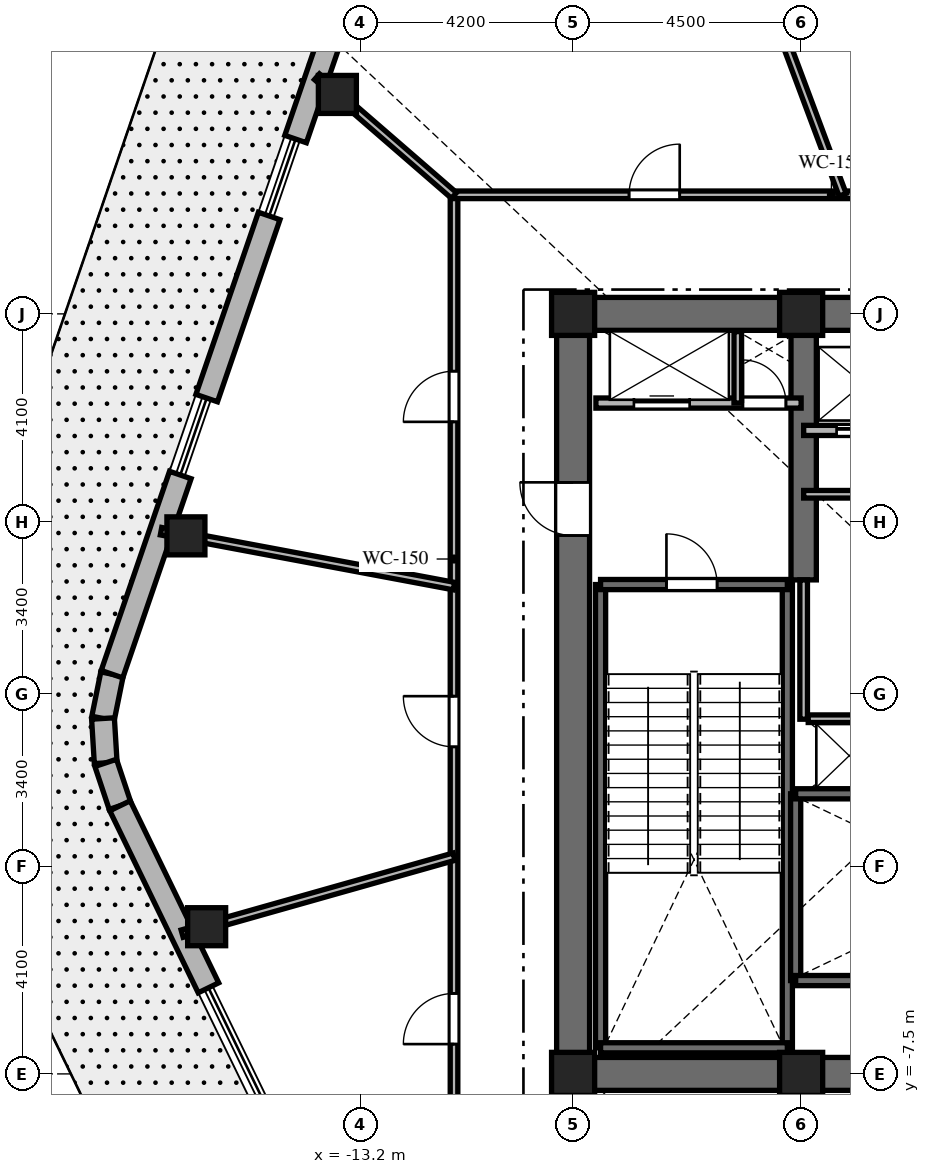
"""IFC4 building model, lengths in metres.
Left out: names, types, materials, properties, quantities, classifications, styles, units other than length and angle.
Written with IfcOpenShell. Run it as: python <this file> out.ifc"""

import sys

from ifc_helpers import new_model, si_unit, direction, frame, frame_2d, origin, origin_2d, place, context, subcontext, project, spatial, rectangle, extrude, element, fill, save


model = new_model("IFC4")
c1 = context("Model", 3, precision=1e-05, world=origin(), true_north=direction((0.0, 1.0)))
c2 = subcontext(c1, "Body", "Model", "MODEL_VIEW")
j1 = project(units=[si_unit("LENGTHUNIT", "METRE"), si_unit("PLANEANGLEUNIT", "RADIAN")], contexts=[c1])
p1 = place(None, origin())
s1 = spatial("IfcSite", under=j1, at=p1, CompositionType="ELEMENT")
p2 = place(p1, origin())
s2 = spatial("IfcBuilding", under=s1, at=p2, CompositionType="ELEMENT")
p3 = place(p2, frame((0.0, 0.0, 305.4)))
s3 = spatial("IfcBuildingStorey", under=s2, at=p3, CompositionType="ELEMENT", Elevation=305.4)
p4 = place(p3, frame((-9.325, -7.5, 0.0), z_axis=(0.0, 0.0, 1.0), x_axis=(1.0, 0.0, 0.0)))
e1 = element("IfcWall", 1, at=p4, inside=s3, PredefinedType="SHEAR", context=c2, shape_type="SweptSolid", body=[
    extrude(rectangle(XDim=18.65, YDim=0.65, at=frame_2d((9.325, 0.0))), origin(), (0.0, 0.0, 1.0), 5.0),
])
p5 = place(p4, frame((9.375, 0.0, 0.0)))
e2 = element("IfcOpeningElement", 2, at=p5, cuts=e1, PredefinedType="OPENING", context=c2, shape_type="SweptSolid", body=[
    extrude(rectangle(XDim=1.0, YDim=2.15, at=frame_2d((0.5, 1.075))), frame((0.0, 0.335, 0.0), z_axis=(0.0, -1.0, 0.0), x_axis=(1.0, 0.0, 0.0)), (0.0, 0.0, 1.0), 0.67),
])
p6 = place(p3, frame((-9.325, 7.5, 0.0), z_axis=(0.0, 0.0, 1.0), x_axis=(1.0, 0.0, 0.0)))
e3 = element("IfcWall", 3, at=p6, inside=s3, PredefinedType="SHEAR", context=c2, shape_type="SweptSolid", body=[
    extrude(rectangle(XDim=9.375, YDim=0.65, at=frame_2d((4.688, 0.0))), origin(), (0.0, 0.0, 1.0), 5.0),
])
p7 = place(p3, frame((-9.0, -7.175, 0.0), z_axis=(0.0, 0.0, 1.0), x_axis=(0.0, 1.0, 0.0)))
e4 = element("IfcWall", 4, at=p7, inside=s3, PredefinedType="SHEAR", context=c2, shape_type="SweptSolid", body=[
    extrude(rectangle(XDim=14.35, YDim=0.65, at=frame_2d((7.175, 0.0))), origin(), (0.0, 0.0, 1.0), 5.0),
])
p8 = place(p7, frame((10.3, 0.0, 0.0)))
e5 = element("IfcOpeningElement", 5, at=p8, cuts=e4, PredefinedType="OPENING", context=c2, shape_type="SweptSolid", body=[
    extrude(rectangle(XDim=1.05, YDim=2.15, at=frame_2d((0.525, 1.075))), frame((0.0, 0.335, 0.0), z_axis=(0.0, -1.0, 0.0), x_axis=(1.0, 0.0, 0.0)), (0.0, 0.0, 1.0), 0.67),
])
p9 = place(p3, frame((-4.45, 2.25, 0.0), z_axis=(0.0, 0.0, 1.0), x_axis=(0.0, 1.0, 0.0)))
e6 = element("IfcWall", 6, at=p9, inside=s3, PredefinedType="SHEAR", context=c2, shape_type="SweptSolid", body=[
    extrude(rectangle(XDim=4.925, YDim=0.5, at=frame_2d((2.462, 0.0))), origin(), (0.0, 0.0, 1.0), 5.0),
])
for number, where, z_axis, x_axis in (
    (7, (-8.458, -6.985, 0.0), (0.0, 0.0, 1.0), (0.0, 1.0, 0.0)),
    (8, (-4.772, -6.985, 0.0), (0.0, 0.0, 1.0), (0.0, 1.0, 0.0)),
):
    element("IfcWall", number, at=place(p3, frame(where, z_axis=z_axis, x_axis=x_axis)), inside=s3, PredefinedType="SHEAR", context=c2, shape_type="SweptSolid", body=[
        extrude(rectangle(XDim=9.143, YDim=0.2, at=frame_2d((4.572, 0.0))), origin(), (0.0, 0.0, 1.0), 5.0),
    ])
p10 = place(p3, frame((-8.458, -6.985, 0.0), z_axis=(0.0, 0.0, 1.0), x_axis=(1.0, 0.0, 0.0)))
e9 = element("IfcWall", 9, at=p10, inside=s3, PredefinedType="SHEAR", context=c2, shape_type="SweptSolid", body=[
    extrude(rectangle(XDim=3.686, YDim=0.2, at=frame_2d((1.843, 0.0))), origin(), (0.0, 0.0, 1.0), 5.0),
])
p11 = place(p3, frame((-8.458, 2.158, 0.0), z_axis=(0.0, 0.0, 1.0), x_axis=(1.0, 0.0, 0.0)))
e10 = element("IfcWall", 10, at=p11, inside=s3, PredefinedType="SHEAR", context=c2, shape_type="SweptSolid", body=[
    extrude(rectangle(XDim=3.686, YDim=0.2, at=frame_2d((1.843, 0.0))), origin(), (0.0, 0.0, 1.0), 5.0),
])
p12 = place(p11, frame((1.3, 0.0, 0.0)))
e11 = element("IfcOpeningElement", 11, at=p12, cuts=e10, PredefinedType="OPENING", context=c2, shape_type="SweptSolid", body=[
    extrude(rectangle(XDim=1.0, YDim=2.15, at=frame_2d((0.5, 1.075))), frame((0.0, 0.11, 0.0), z_axis=(0.0, -1.0, 0.0), x_axis=(1.0, 0.0, 0.0)), (0.0, 0.0, 1.0), 0.22),
])
p13 = place(p3, frame((-4.608, -5.658, 0.0), z_axis=(0.0, 0.0, 1.0), x_axis=(0.0, 1.0, 0.0)))
e12 = element("IfcWall", 12, at=p13, inside=s3, PredefinedType="SHEAR", context=c2, shape_type="SweptSolid", body=[
    extrude(rectangle(XDim=3.686, YDim=0.2, at=frame_2d((1.843, 0.0))), origin(), (0.0, 0.0, 1.0), 5.0),
])
p14 = place(p3, frame((-4.608, -5.658, 0.0), z_axis=(0.0, 0.0, 1.0), x_axis=(1.0, 0.0, 0.0)))
e13 = element("IfcWall", 13, at=p14, inside=s3, PredefinedType="SHEAR", context=c2, shape_type="SweptSolid", body=[
    extrude(rectangle(XDim=9.166, YDim=0.2, at=frame_2d((4.583, 0.0))), origin(), (0.0, 0.0, 1.0), 5.0),
])
p15 = place(p14, frame((7.45, 0.0, 0.0)))
e14 = element("IfcOpeningElement", 14, at=p15, cuts=e13, PredefinedType="OPENING", context=c2, shape_type="SweptSolid", body=[
    extrude(rectangle(XDim=1.0, YDim=2.15, at=frame_2d((0.5, 1.075))), frame((0.0, 0.11, 0.0), z_axis=(0.0, -1.0, 0.0), x_axis=(1.0, 0.0, 0.0)), (0.0, 0.0, 1.0), 0.22),
])
p16 = place(p3, frame((-4.608, -1.972, 0.0), z_axis=(0.0, 0.0, 1.0), x_axis=(1.0, 0.0, 0.0)))
e15 = element("IfcWall", 15, at=p16, inside=s3, PredefinedType="SHEAR", context=c2, shape_type="SweptSolid", body=[
    extrude(rectangle(XDim=9.166, YDim=0.2, at=frame_2d((4.583, 0.0))), origin(), (0.0, 0.0, 1.0), 5.0),
])
for number, where, z_axis, x_axis in (
    (16, (-9.0, -7.5, 0.0), (0.0, 0.0, 1.0), (1.0, 0.0, 0.0)),
    (17, (-4.5, -7.5, 0.0), (0.0, 0.0, 1.0), (1.0, 0.0, 0.0)),
    (18, (-4.5, 7.5, 0.0), (0.0, 0.0, 1.0), (1.0, 0.0, 0.0)),
    (19, (-9.0, 7.5, 0.0), (0.0, 0.0, 1.0), (1.0, 0.0, 0.0)),
):
    element("IfcColumn", number, at=place(p3, frame(where, z_axis=z_axis, x_axis=x_axis)), inside=s3, PredefinedType="COLUMN", context=c2, shape_type="SweptSolid", body=[
        extrude(rectangle(XDim=0.85, YDim=0.85, at=origin_2d()), origin(), (0.0, 0.0, 1.0), 5.0),
    ])
for number, where, z_axis, x_axis in (
    (20, (-13.652, 11.831, 0.0), (0.0, 0.0, 1.0), (1.0, 0.0, 0.0)),
    (21, (-16.641, 3.119, 0.0), (0.0, 0.0, 1.0), (1.0, 0.0, 0.0)),
    (22, (-16.232, -4.595, 0.0), (0.0, 0.0, 1.0), (1.0, 0.0, 0.0)),
):
    element("IfcColumn", number, at=place(p3, frame(where, z_axis=z_axis, x_axis=x_axis)), inside=s3, PredefinedType="COLUMN", context=c2, shape_type="SweptSolid", body=[
        extrude(rectangle(XDim=0.75, YDim=0.75, at=origin_2d()), origin(), (0.0, 0.0, 1.0), 5.0),
    ])
p17 = place(p3, frame((-18.1, 0.389, 0.0), z_axis=(0.0, 0.0, 1.0), x_axis=(-0.198587865476, -0.980083088154, 0.0)))
e23 = element("IfcWall", 23, at=p17, inside=s3, PredefinedType="SOLIDWALL", context=c2, shape_type="SweptSolid", body=[
    extrude(rectangle(XDim=0.893, YDim=0.45, at=frame_2d((0.446, 0.0))), origin(), (0.0, 0.0, 1.0), 4.68),
])
p18 = place(p3, frame((-18.278, -0.486, 0.0), z_axis=(0.0, 0.0, 1.0), x_axis=(0.060923410031, -0.998142443798, 0.0)))
e24 = element("IfcWall", 24, at=p18, inside=s3, PredefinedType="SOLIDWALL", context=c2, shape_type="SweptSolid", body=[
    extrude(rectangle(XDim=0.878, YDim=0.45, at=frame_2d((0.439, 0.0))), origin(), (0.0, 0.0, 1.0), 4.68),
])
p19 = place(p3, frame((-18.224, -1.362, 0.0), z_axis=(0.0, 0.0, 1.0), x_axis=(0.316227766017, -0.948683298051, 0.0)))
e25 = element("IfcWall", 25, at=p19, inside=s3, PredefinedType="SOLIDWALL", context=c2, shape_type="SweptSolid", body=[
    extrude(rectangle(XDim=0.893, YDim=0.45, at=frame_2d((0.446, 0.0))), origin(), (0.0, 0.0, 1.0), 4.68),
])
p20 = place(p3, frame((-13.131, 14.873, 0.0), z_axis=(0.0, 0.0, 1.0), x_axis=(-0.324498911717, -0.945886069405, 0.0)))
e26 = element("IfcWall", 26, at=p20, inside=s3, PredefinedType="SOLIDWALL", context=c2, shape_type="SweptSolid", body=[
    extrude(rectangle(XDim=4.147, YDim=0.45, at=frame_2d((2.073, 0.0))), origin(), (0.0, 0.0, 1.0), 4.68),
])
p21 = place(p3, frame((-14.998, 9.433, 0.0), z_axis=(0.0, 0.0, 1.0), x_axis=(-0.324503351443, -0.945884546286, 0.0)))
e27 = element("IfcWall", 27, at=p21, inside=s3, PredefinedType="SOLIDWALL", context=c2, shape_type="SweptSolid", body=[
    extrude(rectangle(XDim=3.8, YDim=0.45, at=frame_2d((1.9, 0.0))), origin(), (0.0, 0.0, 1.0), 4.68),
])
p22 = place(p3, frame((-16.752, 4.32, 0.0), z_axis=(0.0, 0.0, 1.0), x_axis=(-0.324516563827, -0.945880013428, 0.0)))
e28 = element("IfcWall", 28, at=p22, inside=s3, PredefinedType="SOLIDWALL", context=c2, shape_type="SweptSolid", body=[
    extrude(rectangle(XDim=4.156, YDim=0.45, at=frame_2d((2.078, 0.0))), origin(), (0.0, 0.0, 1.0), 4.68),
])
p23 = place(p3, frame((-17.942, -2.208, 0.0), z_axis=(0.0, 0.0, 1.0), x_axis=(0.437062225544, -0.899431270861, 0.0)))
e29 = element("IfcWall", 29, at=p23, inside=s3, PredefinedType="SOLIDWALL", context=c2, shape_type="SweptSolid", body=[
    extrude(rectangle(XDim=3.994, YDim=0.45, at=frame_2d((1.997, 0.0))), origin(), (0.0, 0.0, 1.0), 4.68),
])
p24 = place(p3, frame((-8.55, 5.74, 0.0), z_axis=(0.0, 0.0, 1.0), x_axis=(1.0, 0.0, 0.0)))
e30 = element("IfcWall", 30, at=p24, inside=s3, PredefinedType="PARTITIONING", context=c2, shape_type="SweptSolid", body=[
    extrude(rectangle(XDim=4.05, YDim=0.2, at=frame_2d((2.025, 0.0))), origin(), (0.0, 0.0, 1.0), 4.68),
])
p25 = place(p24, frame((0.75, 0.0, 0.0)))
e31 = element("IfcOpeningElement", 31, at=p25, cuts=e30, PredefinedType="OPENING", context=c2, shape_type="SweptSolid", body=[
    extrude(rectangle(XDim=1.1, YDim=2.2, at=frame_2d((0.55, 1.1))), frame((0.0, 0.11, 0.0), z_axis=(0.0, -1.0, 0.0), x_axis=(1.0, 0.0, 0.0)), (0.0, 0.0, 1.0), 0.22),
])
p26 = place(p24, frame((2.9, 0.0, 0.0)))
e32 = element("IfcOpeningElement", 32, at=p26, cuts=e30, PredefinedType="OPENING", context=c2, shape_type="SweptSolid", body=[
    extrude(rectangle(XDim=0.85, YDim=2.03, at=frame_2d((0.425, 1.015))), frame((0.0, 0.11, 0.0), z_axis=(0.0, -1.0, 0.0), x_axis=(1.0, 0.0, 0.0)), (0.0, 0.0, 1.0), 0.22),
])
p27 = place(p3, frame((-5.75, 5.74, 0.0), z_axis=(0.0, 0.0, 1.0), x_axis=(0.0, 1.0, 0.0)))
e33 = element("IfcWall", 33, at=p27, inside=s3, PredefinedType="PARTITIONING", context=c2, shape_type="SweptSolid", body=[
    extrude(rectangle(XDim=1.41, YDim=0.15, at=frame_2d((0.705, 0.0))), origin(), (0.0, 0.0, 1.0), 4.68),
])
p28 = place(p3, frame((-4.45, 5.2, 0.0), z_axis=(0.0, 0.0, 1.0), x_axis=(1.0, 0.0, 0.0)))
e34 = element("IfcWall", 34, at=p28, inside=s3, PredefinedType="PARTITIONING", context=c2, shape_type="SweptSolid", body=[
    extrude(rectangle(XDim=4.5, YDim=0.2, at=frame_2d((2.25, 0.0))), origin(), (0.0, 0.0, 1.0), 4.68),
])
p29 = place(p28, frame((0.65, 0.0, 0.0)))
e35 = element("IfcOpeningElement", 35, at=p29, cuts=e34, PredefinedType="OPENING", context=c2, shape_type="SweptSolid", body=[
    extrude(rectangle(XDim=1.0, YDim=2.2, at=frame_2d((0.5, 1.1))), frame((0.0, 0.11, 0.0), z_axis=(0.0, -1.0, 0.0), x_axis=(1.0, 0.0, 0.0)), (0.0, 0.0, 1.0), 0.22),
])
p30 = place(p28, frame((2.85, 0.0, 0.0)))
e36 = element("IfcOpeningElement", 36, at=p30, cuts=e34, PredefinedType="OPENING", context=c2, shape_type="SweptSolid", body=[
    extrude(rectangle(XDim=1.0, YDim=2.2, at=frame_2d((0.5, 1.1))), frame((0.0, 0.11, 0.0), z_axis=(0.0, -1.0, 0.0), x_axis=(1.0, 0.0, 0.0)), (0.0, 0.0, 1.0), 0.22),
])
p31 = place(p3, frame((-4.45, -0.5, 0.0), z_axis=(0.0, 0.0, 1.0), x_axis=(0.0, 1.0, 0.0)))
e37 = element("IfcWall", 37, at=p31, inside=s3, PredefinedType="PARTITIONING", context=c2, shape_type="SweptSolid", body=[
    extrude(rectangle(XDim=2.75, YDim=0.15, at=frame_2d((1.375, 0.0))), origin(), (0.0, 0.0, 1.0), 4.68),
])
p32 = place(p3, frame((-4.45, 3.94, 0.0), z_axis=(0.0, 0.0, 1.0), x_axis=(1.0, 0.0, 0.0)))
e38 = element("IfcWall", 38, at=p32, inside=s3, PredefinedType="PARTITIONING", context=c2, shape_type="SweptSolid", body=[
    extrude(rectangle(XDim=2.55, YDim=0.15, at=frame_2d((1.275, 0.0))), origin(), (0.0, 0.0, 1.0), 4.68),
])
p33 = place(p3, frame((-4.36, -0.49, 0.0), z_axis=(0.0, 0.0, 1.0), x_axis=(1.0, 0.0, 0.0)))
e39 = element("IfcWall", 39, at=p33, inside=s3, PredefinedType="PARTITIONING", context=c2, shape_type="SweptSolid", body=[
    extrude(rectangle(XDim=8.72, YDim=0.15, at=frame_2d((4.36, 0.0))), origin(), (0.0, 0.0, 1.0), 4.68),
])
p34 = place(p33, frame((2.81, 0.0, 0.0)))
e40 = element("IfcOpeningElement", 40, at=p34, cuts=e39, PredefinedType="OPENING", context=c2, shape_type="SweptSolid", body=[
    extrude(rectangle(XDim=0.85, YDim=2.03, at=frame_2d((0.425, 1.015))), frame((0.0, 0.085, 0.0), z_axis=(0.0, -1.0, 0.0), x_axis=(1.0, 0.0, 0.0)), (0.0, 0.0, 1.0), 0.17),
])
p35 = place(p33, frame((4.61, 0.0, 0.0)))
e41 = element("IfcOpeningElement", 41, at=p35, cuts=e39, PredefinedType="OPENING", context=c2, shape_type="SweptSolid", body=[
    extrude(rectangle(XDim=0.85, YDim=2.03, at=frame_2d((0.425, 1.015))), frame((0.0, 0.085, 0.0), z_axis=(0.0, -1.0, 0.0), x_axis=(1.0, 0.0, 0.0)), (0.0, 0.0, 1.0), 0.17),
])
p36 = place(p3, frame((-11.35, -9.85, 0.0), z_axis=(0.0, 0.0, 1.0), x_axis=(0.0, 1.0, 0.0)))
e42 = element("IfcWall", 42, at=p36, inside=s3, PredefinedType="PARTITIONING", context=c2, shape_type="SweptSolid", body=[
    extrude(rectangle(XDim=19.7, YDim=0.15, at=frame_2d((9.85, 0.0))), origin(), (0.0, 0.0, 1.0), 2.87),
])
p37 = place(p36, frame((15.219, 0.0, 0.0)))
e43 = element("IfcOpeningElement", 43, at=p37, cuts=e42, PredefinedType="OPENING", context=c2, shape_type="SweptSolid", body=[
    extrude(rectangle(XDim=1.0, YDim=2.03, at=frame_2d((0.5, 1.015))), frame((0.0, 0.085, 0.0), z_axis=(0.0, -1.0, 0.0), x_axis=(1.0, 0.0, 0.0)), (0.0, 0.0, 1.0), 0.17),
])
p38 = place(p36, frame((8.805, 0.0, 0.0)))
e44 = element("IfcOpeningElement", 44, at=p38, cuts=e42, PredefinedType="OPENING", context=c2, shape_type="SweptSolid", body=[
    extrude(rectangle(XDim=1.0, YDim=2.03, at=frame_2d((0.5, 1.015))), frame((0.0, 0.085, 0.0), z_axis=(0.0, -1.0, 0.0), x_axis=(1.0, 0.0, 0.0)), (0.0, 0.0, 1.0), 0.17),
])
p39 = place(p36, frame((2.938, 0.0, 0.0)))
e45 = element("IfcOpeningElement", 45, at=p39, cuts=e42, PredefinedType="OPENING", context=c2, shape_type="SweptSolid", body=[
    extrude(rectangle(XDim=1.0, YDim=2.03, at=frame_2d((0.5, 1.015))), frame((0.0, 0.085, 0.0), z_axis=(0.0, -1.0, 0.0), x_axis=(1.0, 0.0, 0.0)), (0.0, 0.0, 1.0), 0.17),
])
p40 = place(p3, frame((-11.35, 9.85, 0.0), z_axis=(0.0, 0.0, 1.0), x_axis=(1.0, 0.0, 0.0)))
e46 = element("IfcWall", 46, at=p40, inside=s3, PredefinedType="PARTITIONING", context=c2, shape_type="SweptSolid", body=[
    extrude(rectangle(XDim=22.7, YDim=0.15, at=frame_2d((11.35, 0.0))), origin(), (0.0, 0.0, 1.0), 2.87),
])
p41 = place(p40, frame((17.249, 0.0, 0.0)))
e47 = element("IfcOpeningElement", 47, at=p41, cuts=e46, PredefinedType="OPENING", context=c2, shape_type="SweptSolid", body=[
    extrude(rectangle(XDim=1.0, YDim=2.03, at=frame_2d((0.5, 1.015))), frame((0.0, 0.085, 0.0), z_axis=(0.0, -1.0, 0.0), x_axis=(1.0, 0.0, 0.0)), (0.0, 0.0, 1.0), 0.17),
])
p42 = place(p40, frame((10.441, 0.0, 0.0)))
e48 = element("IfcOpeningElement", 48, at=p42, cuts=e46, PredefinedType="OPENING", context=c2, shape_type="SweptSolid", body=[
    extrude(rectangle(XDim=1.0, YDim=2.03, at=frame_2d((0.5, 1.015))), frame((0.0, 0.085, 0.0), z_axis=(0.0, -1.0, 0.0), x_axis=(1.0, 0.0, 0.0)), (0.0, 0.0, 1.0), 0.17),
])
p43 = place(p40, frame((3.454, 0.0, 0.0)))
e49 = element("IfcOpeningElement", 49, at=p43, cuts=e46, PredefinedType="OPENING", context=c2, shape_type="SweptSolid", body=[
    extrude(rectangle(XDim=1.0, YDim=2.03, at=frame_2d((0.5, 1.015))), frame((0.0, 0.085, 0.0), z_axis=(0.0, -1.0, 0.0), x_axis=(1.0, 0.0, 0.0)), (0.0, 0.0, 1.0), 0.17),
])
p44 = place(p3, frame((-3.681, 9.85, 0.0), z_axis=(0.0, 0.0, 1.0), x_axis=(-0.350079676448, 0.936719926199, 0.0)))
e50 = element("IfcWall", 50, at=p44, inside=s3, PredefinedType="PARTITIONING", context=c2, shape_type="SweptSolid", body=[
    extrude(rectangle(XDim=7.82, YDim=0.15, at=frame_2d((3.91, 0.0))), origin(), (0.0, 0.0, 1.0), 2.87),
])
p45 = place(p3, frame((-11.35, 9.836, 0.0), z_axis=(0.0, 0.0, 1.0), x_axis=(-0.755716089778, 0.65489937521, 0.0)))
e51 = element("IfcWall", 51, at=p45, inside=s3, PredefinedType="PARTITIONING", context=c2, shape_type="SweptSolid", body=[
    extrude(rectangle(XDim=3.579, YDim=0.15, at=frame_2d((1.79, 0.0))), origin(), (0.0, 0.0, 1.0), 2.87),
])
p46 = place(p3, frame((-11.35, 2.127, 0.0), z_axis=(0.0, 0.0, 1.0), x_axis=(-0.982876415115, 0.184265983326, 0.0)))
e52 = element("IfcWall", 52, at=p46, inside=s3, PredefinedType="PARTITIONING", context=c2, shape_type="SweptSolid", body=[
    extrude(rectangle(XDim=5.883, YDim=0.15, at=frame_2d((2.941, 0.0))), origin(), (0.0, 0.0, 1.0), 2.87),
])
p47 = place(p3, frame((-11.35, -3.213, 0.0), z_axis=(0.0, 0.0, 1.0), x_axis=(-0.962182015747, -0.272407357782, 0.0)))
e53 = element("IfcWall", 53, at=p47, inside=s3, PredefinedType="PARTITIONING", context=c2, shape_type="SweptSolid", body=[
    extrude(rectangle(XDim=5.576, YDim=0.15, at=frame_2d((2.788, 0.0))), origin(), (0.0, 0.0, 1.0), 2.87),
])
p48 = place(p12, origin())
e54 = element("IfcDoor", 54, at=p48, inside=s3, OperationType="SINGLE_SWING_LEFT", PredefinedType="DOOR", context=c2, shape_type="SweptSolid", body=[
    extrude(rectangle(XDim=1.0, YDim=2.15, at=frame_2d((0.5, 1.075))), frame((0.0, 0.025, 0.0), z_axis=(0.0, -1.0, 0.0), x_axis=(1.0, 0.0, 0.0)), (0.0, 0.0, 1.0), 0.05),
])
fill(e11, e54)
p49 = place(p8, origin())
e55 = element("IfcDoor", 55, at=p49, inside=s3, OperationType="SINGLE_SWING_RIGHT", PredefinedType="DOOR", context=c2, shape_type="SweptSolid", body=[
    extrude(rectangle(XDim=1.05, YDim=2.15, at=frame_2d((0.525, 1.075))), frame((0.0, 0.025, 0.0), z_axis=(0.0, -1.0, 0.0), x_axis=(1.0, 0.0, 0.0)), (0.0, 0.0, 1.0), 0.05),
])
fill(e5, e55)
p50 = place(p25, origin())
e56 = element("IfcDoor", 56, at=p50, inside=s3, OperationType="SLIDING_TO_LEFT", PredefinedType="DOOR", context=c2, shape_type="SweptSolid", body=[
    extrude(rectangle(XDim=1.1, YDim=2.2, at=frame_2d((0.55, 1.1))), frame((0.0, 0.025, 0.0), z_axis=(0.0, -1.0, 0.0), x_axis=(1.0, 0.0, 0.0)), (0.0, 0.0, 1.0), 0.05),
])
fill(e31, e56)
p51 = place(p26, origin())
e57 = element("IfcDoor", 57, at=p51, inside=s3, OperationType="SINGLE_SWING_LEFT", PredefinedType="DOOR", context=c2, shape_type="SweptSolid", body=[
    extrude(rectangle(XDim=0.85, YDim=2.03, at=frame_2d((0.425, 1.015))), frame((0.0, 0.025, 0.0), z_axis=(0.0, -1.0, 0.0), x_axis=(1.0, 0.0, 0.0)), (0.0, 0.0, 1.0), 0.05),
])
fill(e32, e57)
p52 = place(p29, origin())
e58 = element("IfcDoor", 58, at=p52, inside=s3, OperationType="SLIDING_TO_LEFT", PredefinedType="DOOR", context=c2, shape_type="SweptSolid", body=[
    extrude(rectangle(XDim=1.0, YDim=2.2, at=frame_2d((0.5, 1.1))), frame((0.0, 0.025, 0.0), z_axis=(0.0, -1.0, 0.0), x_axis=(1.0, 0.0, 0.0)), (0.0, 0.0, 1.0), 0.05),
])
fill(e35, e58)
p53 = place(p43, origin())
e59 = element("IfcDoor", 59, at=p53, inside=s3, OperationType="SINGLE_SWING_RIGHT", PredefinedType="DOOR", context=c2, shape_type="SweptSolid", body=[
    extrude(rectangle(XDim=1.0, YDim=2.03, at=frame_2d((0.5, 1.015))), frame((0.0, 0.025, 0.0), z_axis=(0.0, -1.0, 0.0), x_axis=(1.0, 0.0, 0.0)), (0.0, 0.0, 1.0), 0.05),
])
fill(e49, e59)
p54 = place(p37, origin())
e60 = element("IfcDoor", 60, at=p54, inside=s3, OperationType="SINGLE_SWING_LEFT", PredefinedType="DOOR", context=c2, shape_type="SweptSolid", body=[
    extrude(rectangle(XDim=1.0, YDim=2.03, at=frame_2d((0.5, 1.015))), frame((0.0, 0.025, 0.0), z_axis=(0.0, -1.0, 0.0), x_axis=(1.0, 0.0, 0.0)), (0.0, 0.0, 1.0), 0.05),
])
fill(e43, e60)
p55 = place(p38, origin())
e61 = element("IfcDoor", 61, at=p55, inside=s3, OperationType="SINGLE_SWING_RIGHT", PredefinedType="DOOR", context=c2, shape_type="SweptSolid", body=[
    extrude(rectangle(XDim=1.0, YDim=2.03, at=frame_2d((0.5, 1.015))), frame((0.0, 0.025, 0.0), z_axis=(0.0, -1.0, 0.0), x_axis=(1.0, 0.0, 0.0)), (0.0, 0.0, 1.0), 0.05),
])
fill(e44, e61)
p56 = place(p39, origin())
e62 = element("IfcDoor", 62, at=p56, inside=s3, OperationType="SINGLE_SWING_LEFT", PredefinedType="DOOR", context=c2, shape_type="SweptSolid", body=[
    extrude(rectangle(XDim=1.0, YDim=2.03, at=frame_2d((0.5, 1.015))), frame((0.0, 0.025, 0.0), z_axis=(0.0, -1.0, 0.0), x_axis=(1.0, 0.0, 0.0)), (0.0, 0.0, 1.0), 0.05),
])
fill(e45, e62)
save(model, sys.argv[1])
